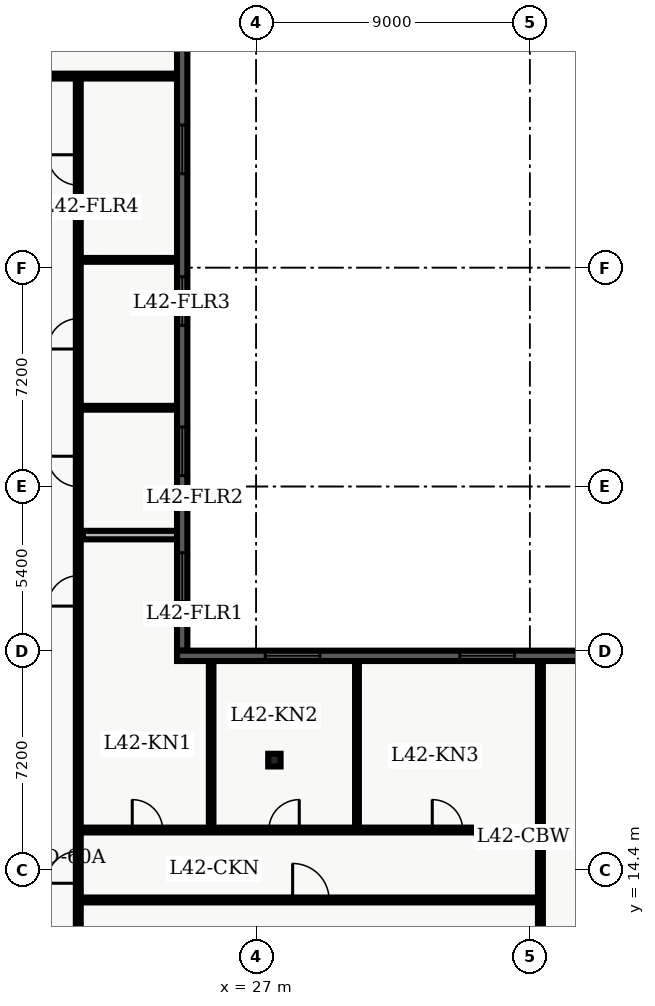
"""IFC4 building model, lengths in metres.
Left out: names, types, materials, properties, quantities, classifications, styles, units other than length and angle.
Written with IfcOpenShell. Run it as: python <this file> out.ifc"""

import sys

from ifc_helpers import new_model, entity, si_unit, converted_unit, direction, frame, origin_with_axes, origin_2d_with_axis, place, context, subcontext, project, spatial, polyline, rectangle, i_section, outline, extrude, element, fill, save


model = new_model("IFC4")
c1 = context("Model", 3, precision=1e-05, world=origin_with_axes(), true_north=direction((0.0, 1.0)))
c2 = subcontext(c1, "Body", "Model", "MODEL_VIEW")
j1 = project(units=[si_unit("LENGTHUNIT", "METRE"), converted_unit("PLANEANGLEUNIT", "DEGREE", entity("IfcPlaneAngleMeasure", 0.017), si_unit("PLANEANGLEUNIT", "RADIAN"), dimensions=[0, 0, 0, 0, 0, 0, 0])], contexts=[c1])
p1 = place(None, origin_with_axes())
s1 = spatial("IfcSite", under=j1, at=p1, CompositionType="ELEMENT")
p2 = place(p1, origin_with_axes())
s2 = spatial("IfcBuilding", under=s1, at=p2, CompositionType="ELEMENT")
p3 = place(p2, frame((0.0, 0.0, 171.9), z_axis=(0.0, 0.0, 1.0), x_axis=(1.0, 0.0, 0.0)))
s3 = spatial("IfcBuildingStorey", under=s2, at=p3, CompositionType="ELEMENT", Elevation=171.9)
p4 = place(p3, frame((27.6, 18.0, 0.0), z_axis=(0.0, 0.0, 1.0), x_axis=(1.0, 0.0, 0.0)))
e1 = element("IfcColumn", 1, at=p4, inside=s3, PredefinedType="COLUMN", context=c2, shape_type="SweptSolid", body=[
    extrude(i_section(OverallWidth=0.406, OverallDepth=0.416, WebThickness=0.03, FlangeThickness=0.048, FilletRadius=0.022, at=origin_2d_with_axis()), origin_with_axes(), (0.0, 0.0, 1.0), 3.9),
])
p5 = place(p3, frame((2.6, 40.5, 0.0), z_axis=(0.0, 0.0, 1.0), x_axis=(1.0, 0.0, 0.0)))
e2 = element("IfcWall", 2, at=p5, inside=s3, PredefinedType="PARTITIONING", context=c2, shape_type="SweptSolid", body=[
    extrude(outline(polyline([(0.0, -0.08), (21.803, -0.08), (21.803, 0.08), (0.0, 0.08), (0.0, -0.08)])), origin_with_axes(), (0.0, 0.0, 1.0), 2.7),
])
p6 = place(p5, frame((3.13, 0.0, 0.0), z_axis=(0.0, 0.0, 1.0), x_axis=(1.0, 0.0, 0.0)))
e3 = element("IfcOpeningElement", 3, at=p6, cuts=e2, PredefinedType="OPENING", context=c2, shape_type="SweptSolid", body=[
    extrude(rectangle(XDim=1.0, YDim=0.18, at=origin_2d_with_axis()), origin_with_axes(), (0.0, 0.0, 1.0), 2.15),
])
p7 = place(p5, frame((8.277, 0.0, 0.0), z_axis=(0.0, 0.0, 1.0), x_axis=(1.0, 0.0, 0.0)))
e4 = element("IfcOpeningElement", 4, at=p7, cuts=e2, PredefinedType="OPENING", context=c2, shape_type="SweptSolid", body=[
    extrude(rectangle(XDim=1.2, YDim=0.18, at=origin_2d_with_axis()), origin_with_axes(), (0.0, 0.0, 1.0), 2.2),
])
p8 = place(p5, frame((15.553, 0.0, 0.0), z_axis=(0.0, 0.0, 1.0), x_axis=(1.0, 0.0, 0.0)))
e5 = element("IfcOpeningElement", 5, at=p8, cuts=e2, PredefinedType="OPENING", context=c2, shape_type="SweptSolid", body=[
    extrude(rectangle(XDim=1.0, YDim=0.18, at=origin_2d_with_axis()), origin_with_axes(), (0.0, 0.0, 1.0), 2.15),
])
p9 = place(p3, frame((21.15, 7.8, 0.0), z_axis=(0.0, 0.0, 1.0), x_axis=(0.0, 1.0, 0.0)))
e6 = element("IfcWall", 6, at=p9, inside=s3, PredefinedType="PARTITIONING", context=c2, shape_type="SweptSolid", body=[
    extrude(outline(polyline([(0.0, -0.08), (32.7, -0.08), (32.7, 0.08), (0.0, 0.08), (0.0, -0.08)])), origin_with_axes(), (0.0, 0.0, 1.0), 2.7),
])
p10 = place(p9, frame((15.766, 0.0, 0.0), z_axis=(0.0, 0.0, 1.0), x_axis=(1.0, 0.0, 0.0)))
e7 = element("IfcOpeningElement", 7, at=p10, cuts=e6, PredefinedType="OPENING", context=c2, shape_type="SweptSolid", body=[
    extrude(rectangle(XDim=1.0, YDim=0.18, at=origin_2d_with_axis()), origin_with_axes(), (0.0, 0.0, 1.0), 2.15),
])
p11 = place(p9, frame((19.696, 0.0, 0.0), z_axis=(0.0, 0.0, 1.0), x_axis=(1.0, 0.0, 0.0)))
e8 = element("IfcOpeningElement", 8, at=p11, cuts=e6, PredefinedType="OPENING", context=c2, shape_type="SweptSolid", body=[
    extrude(rectangle(XDim=1.0, YDim=0.18, at=origin_2d_with_axis()), origin_with_axes(), (0.0, 0.0, 1.0), 2.15),
])
p12 = place(p9, frame((24.223, 0.0, 0.0), z_axis=(0.0, 0.0, 1.0), x_axis=(1.0, 0.0, 0.0)))
e9 = element("IfcOpeningElement", 9, at=p12, cuts=e6, PredefinedType="OPENING", context=c2, shape_type="SweptSolid", body=[
    extrude(rectangle(XDim=1.0, YDim=0.18, at=origin_2d_with_axis()), origin_with_axes(), (0.0, 0.0, 1.0), 2.15),
])
p13 = place(p9, frame((29.613, 0.0, 0.0), z_axis=(0.0, 0.0, 1.0), x_axis=(1.0, 0.0, 0.0)))
e10 = element("IfcOpeningElement", 10, at=p13, cuts=e6, PredefinedType="OPENING", context=c2, shape_type="SweptSolid", body=[
    extrude(rectangle(XDim=1.0, YDim=0.18, at=origin_2d_with_axis()), origin_with_axes(), (0.0, 0.0, 1.0), 2.15),
])
p14 = place(p9, frame((6.675, 0.0, 0.0), z_axis=(0.0, 0.0, 1.0), x_axis=(1.0, 0.0, 0.0)))
e11 = element("IfcOpeningElement", 11, at=p14, cuts=e6, PredefinedType="OPENING", context=c2, shape_type="SweptSolid", body=[
    extrude(rectangle(XDim=1.05, YDim=0.18, at=origin_2d_with_axis()), origin_with_axes(), (0.0, 0.0, 1.0), 2.15),
])
p15 = place(p3, frame((21.3, 25.402, 0.0), z_axis=(0.0, 0.0, 1.0), x_axis=(1.0, 0.0, 0.0)))
e12 = element("IfcWall", 12, at=p15, inside=s3, PredefinedType="PARTITIONING", context=c2, shape_type="SweptSolid", body=[
    extrude(outline(polyline([(0.0, -0.14), (3.103, -0.14), (3.103, 0.14), (0.0, 0.14), (0.0, -0.14)])), origin_with_axes(), (0.0, 0.0, 1.0), 2.7),
])
for number, where, z_axis, x_axis in (
    (13, (21.3, 29.59, 0.0), (0.0, 0.0, 1.0), (1.0, 0.0, 0.0)),
    (14, (21.3, 34.455, 0.0), (0.0, 0.0, 1.0), (1.0, 0.0, 0.0)),
):
    element("IfcWall", number, at=place(p3, frame(where, z_axis=z_axis, x_axis=x_axis)), inside=s3, PredefinedType="PARTITIONING", context=c2, shape_type="SweptSolid", body=[
        extrude(outline(polyline([(0.0, -0.062), (3.103, -0.062), (3.103, 0.062), (0.0, 0.062), (0.0, -0.062)])), origin_with_axes(), (0.0, 0.0, 1.0), 2.7),
    ])
p16 = place(p3, frame((21.15, 13.4, 0.0), z_axis=(0.0, 0.0, 1.0), x_axis=(1.0, 0.0, 0.0)))
e15 = element("IfcWall", 15, at=p16, inside=s3, PredefinedType="PARTITIONING", context=c2, shape_type="SweptSolid", body=[
    extrude(outline(polyline([(0.0, -0.08), (15.2, -0.08), (15.2, 0.08), (0.0, 0.08), (0.0, -0.08)])), origin_with_axes(), (0.0, 0.0, 1.0), 2.7),
])
p17 = place(p16, frame((7.65, 0.0, 0.0), z_axis=(0.0, 0.0, 1.0), x_axis=(1.0, 0.0, 0.0)))
e16 = element("IfcOpeningElement", 16, at=p17, cuts=e15, PredefinedType="OPENING", context=c2, shape_type="SweptSolid", body=[
    extrude(rectangle(XDim=1.2, YDim=0.18, at=origin_2d_with_axis()), origin_with_axes(), (0.0, 0.0, 1.0), 2.2),
])
p18 = place(p3, frame((21.15, 15.7, 0.0), z_axis=(0.0, 0.0, 1.0), x_axis=(1.0, 0.0, 0.0)))
e17 = element("IfcWall", 17, at=p18, inside=s3, PredefinedType="PARTITIONING", context=c2, shape_type="SweptSolid", body=[
    extrude(outline(polyline([(0.0, -0.08), (15.2, -0.08), (15.2, 0.08), (0.0, 0.08), (0.0, -0.08)])), origin_with_axes(), (0.0, 0.0, 1.0), 2.7),
])
p19 = place(p18, frame((2.275, 0.0, 0.0), z_axis=(0.0, 0.0, 1.0), x_axis=(1.0, 0.0, 0.0)))
e18 = element("IfcOpeningElement", 18, at=p19, cuts=e17, PredefinedType="OPENING", context=c2, shape_type="SweptSolid", body=[
    extrude(rectangle(XDim=1.0, YDim=0.18, at=origin_2d_with_axis()), origin_with_axes(), (0.0, 0.0, 1.0), 2.15),
])
p20 = place(p18, frame((6.768, 0.0, 0.0), z_axis=(0.0, 0.0, 1.0), x_axis=(1.0, 0.0, 0.0)))
e19 = element("IfcOpeningElement", 19, at=p20, cuts=e17, PredefinedType="OPENING", context=c2, shape_type="SweptSolid", body=[
    extrude(rectangle(XDim=1.0, YDim=0.18, at=origin_2d_with_axis()), origin_with_axes(), (0.0, 0.0, 1.0), 2.15),
])
p21 = place(p18, frame((12.143, 0.0, 0.0), z_axis=(0.0, 0.0, 1.0), x_axis=(1.0, 0.0, 0.0)))
e20 = element("IfcOpeningElement", 20, at=p21, cuts=e17, PredefinedType="OPENING", context=c2, shape_type="SweptSolid", body=[
    extrude(rectangle(XDim=1.0, YDim=0.18, at=origin_2d_with_axis()), origin_with_axes(), (0.0, 0.0, 1.0), 2.15),
])
p22 = place(p3, frame((36.35, 4.35, 0.0), z_axis=(0.0, 0.0, 1.0), x_axis=(0.0, 1.0, 0.0)))
e21 = element("IfcWall", 21, at=p22, inside=s3, PredefinedType="PARTITIONING", context=c2, shape_type="SweptSolid", body=[
    extrude(outline(polyline([(0.0, -0.08), (16.95, -0.08), (16.95, 0.08), (0.0, 0.08), (0.0, -0.08)])), origin_with_axes(), (0.0, 0.0, 1.0), 2.7),
])
p23 = place(p3, frame((25.52, 15.82, 0.0), z_axis=(0.0, 0.0, 1.0), x_axis=(0.0, 1.0, 0.0)))
e22 = element("IfcWall", 22, at=p23, inside=s3, PredefinedType="PARTITIONING", context=c2, shape_type="SweptSolid", body=[
    extrude(outline(polyline([(0.0, -0.075), (5.445, -0.075), (5.445, 0.075), (0.0, 0.075), (0.0, -0.075)])), origin_with_axes(), (0.0, 0.0, 1.0), 2.7),
])
p24 = place(p3, frame((30.316, 15.82, 0.0), z_axis=(0.0, 0.0, 1.0), x_axis=(0.0, 1.0, 0.0)))
e23 = element("IfcWall", 23, at=p24, inside=s3, PredefinedType="PARTITIONING", context=c2, shape_type="SweptSolid", body=[
    extrude(outline(polyline([(0.0, -0.062), (5.445, -0.062), (5.445, 0.062), (0.0, 0.062), (0.0, -0.062)])), origin_with_axes(), (0.0, 0.0, 1.0), 2.7),
])
p25 = place(p3, frame((24.568, 45.5, 0.0), z_axis=(0.0, 0.0, 1.0), x_axis=(0.0, -1.0, 0.0)))
e24 = element("IfcWall", 24, at=p25, inside=s3, PredefinedType="SOLIDWALL", context=c2, shape_type="SweptSolid", body=[
    extrude(outline(polyline([(0.0, -0.17), (23.9, -0.17), (23.9, 0.17), (0.0, 0.17), (0.0, -0.17)])), origin_with_axes(), (0.0, 0.0, 1.0), 3.66),
])
p26 = place(p25, frame((2.87, 0.0, 0.45), z_axis=(0.0, 0.0, 1.0), x_axis=(1.0, 0.0, 0.0)))
e25 = element("IfcOpeningElement", 25, at=p26, cuts=e24, PredefinedType="OPENING", context=c2, shape_type="SweptSolid", body=[
    extrude(rectangle(XDim=1.6, YDim=0.36, at=origin_2d_with_axis()), origin_with_axes(), (0.0, 0.0, 1.0), 2.2),
])
p27 = place(p25, frame((7.41, 0.0, 0.45), z_axis=(0.0, 0.0, 1.0), x_axis=(1.0, 0.0, 0.0)))
e26 = element("IfcOpeningElement", 26, at=p27, cuts=e24, PredefinedType="OPENING", context=c2, shape_type="SweptSolid", body=[
    extrude(rectangle(XDim=1.6, YDim=0.36, at=origin_2d_with_axis()), origin_with_axes(), (0.0, 0.0, 1.0), 2.2),
])
p28 = place(p25, frame((12.4, 0.0, 0.45), z_axis=(0.0, 0.0, 1.0), x_axis=(1.0, 0.0, 0.0)))
e27 = element("IfcOpeningElement", 27, at=p28, cuts=e24, PredefinedType="OPENING", context=c2, shape_type="SweptSolid", body=[
    extrude(rectangle(XDim=1.6, YDim=0.36, at=origin_2d_with_axis()), origin_with_axes(), (0.0, 0.0, 1.0), 2.2),
])
p29 = place(p25, frame((17.34, 0.0, 0.45), z_axis=(0.0, 0.0, 1.0), x_axis=(1.0, 0.0, 0.0)))
e28 = element("IfcOpeningElement", 28, at=p29, cuts=e24, PredefinedType="OPENING", context=c2, shape_type="SweptSolid", body=[
    extrude(rectangle(XDim=1.6, YDim=0.36, at=origin_2d_with_axis()), origin_with_axes(), (0.0, 0.0, 1.0), 2.2),
])
p30 = place(p25, frame((21.48, 0.0, 0.45), z_axis=(0.0, 0.0, 1.0), x_axis=(1.0, 0.0, 0.0)))
e29 = element("IfcOpeningElement", 29, at=p30, cuts=e24, PredefinedType="OPENING", context=c2, shape_type="SweptSolid", body=[
    extrude(rectangle(XDim=1.6, YDim=0.36, at=origin_2d_with_axis()), origin_with_axes(), (0.0, 0.0, 1.0), 2.2),
])
p31 = place(p3, frame((24.398, 21.43, 0.0), z_axis=(0.0, 0.0, 1.0), x_axis=(1.0, 0.0, 0.0)))
e30 = element("IfcWall", 30, at=p31, inside=s3, PredefinedType="SOLIDWALL", context=c2, shape_type="SweptSolid", body=[
    extrude(outline(polyline([(0.0, -0.17), (14.002, -0.17), (14.002, 0.17), (0.0, 0.17), (0.0, -0.17)])), origin_with_axes(), (0.0, 0.0, 1.0), 3.66),
])
p32 = place(p31, frame((3.801, 0.0, 0.45), z_axis=(0.0, 0.0, 1.0), x_axis=(1.0, 0.0, 0.0)))
e31 = element("IfcOpeningElement", 31, at=p32, cuts=e30, PredefinedType="OPENING", context=c2, shape_type="SweptSolid", body=[
    extrude(rectangle(XDim=1.8, YDim=0.36, at=origin_2d_with_axis()), origin_with_axes(), (0.0, 0.0, 1.0), 2.1),
])
p33 = place(p31, frame((10.201, 0.0, 0.45), z_axis=(0.0, 0.0, 1.0), x_axis=(1.0, 0.0, 0.0)))
e32 = element("IfcOpeningElement", 32, at=p33, cuts=e30, PredefinedType="OPENING", context=c2, shape_type="SweptSolid", body=[
    extrude(rectangle(XDim=1.8, YDim=0.36, at=origin_2d_with_axis()), origin_with_axes(), (0.0, 0.0, 1.0), 2.1),
])
p34 = place(p9, frame((15.766, 0.0, 0.0), z_axis=(0.0, 0.0, 1.0), x_axis=(1.0, 0.0, 0.0)))
e33 = element("IfcDoor", 33, at=p34, inside=s3, OperationType="SINGLE_SWING_LEFT", PredefinedType="DOOR", context=c2, shape_type="SweptSolid", body=[
    extrude(rectangle(XDim=1.0, YDim=0.09, at=origin_2d_with_axis()), origin_with_axes(), (0.0, 0.0, 1.0), 2.15),
])
fill(e7, e33)
p35 = place(p9, frame((19.696, 0.0, 0.0), z_axis=(0.0, 0.0, 1.0), x_axis=(1.0, 0.0, 0.0)))
e34 = element("IfcDoor", 34, at=p35, inside=s3, OperationType="SINGLE_SWING_RIGHT", PredefinedType="DOOR", context=c2, shape_type="SweptSolid", body=[
    extrude(rectangle(XDim=1.0, YDim=0.09, at=origin_2d_with_axis()), origin_with_axes(), (0.0, 0.0, 1.0), 2.15),
])
fill(e8, e34)
p36 = place(p9, frame((24.223, 0.0, 0.0), z_axis=(0.0, 0.0, 1.0), x_axis=(1.0, 0.0, 0.0)))
e35 = element("IfcDoor", 35, at=p36, inside=s3, OperationType="SINGLE_SWING_LEFT", PredefinedType="DOOR", context=c2, shape_type="SweptSolid", body=[
    extrude(rectangle(XDim=1.0, YDim=0.09, at=origin_2d_with_axis()), origin_with_axes(), (0.0, 0.0, 1.0), 2.15),
])
fill(e9, e35)
p37 = place(p9, frame((29.613, 0.0, 0.0), z_axis=(0.0, 0.0, 1.0), x_axis=(1.0, 0.0, 0.0)))
e36 = element("IfcDoor", 36, at=p37, inside=s3, OperationType="SINGLE_SWING_RIGHT", PredefinedType="DOOR", context=c2, shape_type="SweptSolid", body=[
    extrude(rectangle(XDim=1.0, YDim=0.09, at=origin_2d_with_axis()), origin_with_axes(), (0.0, 0.0, 1.0), 2.15),
])
fill(e10, e36)
p38 = place(p9, frame((6.675, 0.0, 0.0), z_axis=(0.0, 0.0, 1.0), x_axis=(1.0, 0.0, 0.0)))
e37 = element("IfcDoor", 37, at=p38, inside=s3, OperationType="SINGLE_SWING_LEFT", PredefinedType="DOOR", context=c2, shape_type="SweptSolid", body=[
    extrude(rectangle(XDim=1.05, YDim=0.09, at=origin_2d_with_axis()), origin_with_axes(), (0.0, 0.0, 1.0), 2.15),
])
fill(e11, e37)
p39 = place(p16, frame((7.65, 0.0, 0.0), z_axis=(0.0, 0.0, 1.0), x_axis=(1.0, 0.0, 0.0)))
e38 = element("IfcDoor", 38, at=p39, inside=s3, OperationType="SINGLE_SWING_LEFT", PredefinedType="DOOR", context=c2, shape_type="SweptSolid", body=[
    extrude(rectangle(XDim=1.2, YDim=0.09, at=origin_2d_with_axis()), origin_with_axes(), (0.0, 0.0, 1.0), 2.2),
])
fill(e16, e38)
p40 = place(p18, frame((2.275, 0.0, 0.0), z_axis=(0.0, 0.0, 1.0), x_axis=(1.0, 0.0, 0.0)))
e39 = element("IfcDoor", 39, at=p40, inside=s3, OperationType="SINGLE_SWING_LEFT", PredefinedType="DOOR", context=c2, shape_type="SweptSolid", body=[
    extrude(rectangle(XDim=1.0, YDim=0.09, at=origin_2d_with_axis()), origin_with_axes(), (0.0, 0.0, 1.0), 2.15),
])
fill(e18, e39)
p41 = place(p18, frame((6.768, 0.0, 0.0), z_axis=(0.0, 0.0, 1.0), x_axis=(1.0, 0.0, 0.0)))
e40 = element("IfcDoor", 40, at=p41, inside=s3, OperationType="SINGLE_SWING_RIGHT", PredefinedType="DOOR", context=c2, shape_type="SweptSolid", body=[
    extrude(rectangle(XDim=1.0, YDim=0.09, at=origin_2d_with_axis()), origin_with_axes(), (0.0, 0.0, 1.0), 2.15),
])
fill(e19, e40)
p42 = place(p18, frame((12.143, 0.0, 0.0), z_axis=(0.0, 0.0, 1.0), x_axis=(1.0, 0.0, 0.0)))
e41 = element("IfcDoor", 41, at=p42, inside=s3, OperationType="SINGLE_SWING_LEFT", PredefinedType="DOOR", context=c2, shape_type="SweptSolid", body=[
    extrude(rectangle(XDim=1.0, YDim=0.09, at=origin_2d_with_axis()), origin_with_axes(), (0.0, 0.0, 1.0), 2.15),
])
fill(e20, e41)
p43 = place(p25, frame((7.41, 0.0, 0.45), z_axis=(0.0, 0.0, 1.0), x_axis=(1.0, 0.0, 0.0)))
e42 = element("IfcWindow", 42, at=p43, inside=s3, PredefinedType="WINDOW", context=c2, shape_type="SweptSolid", body=[
    extrude(rectangle(XDim=1.6, YDim=0.09, at=origin_2d_with_axis()), origin_with_axes(), (0.0, 0.0, 1.0), 2.2),
])
fill(e26, e42)
p44 = place(p25, frame((12.4, 0.0, 0.45), z_axis=(0.0, 0.0, 1.0), x_axis=(1.0, 0.0, 0.0)))
e43 = element("IfcWindow", 43, at=p44, inside=s3, PredefinedType="WINDOW", context=c2, shape_type="SweptSolid", body=[
    extrude(rectangle(XDim=1.6, YDim=0.09, at=origin_2d_with_axis()), origin_with_axes(), (0.0, 0.0, 1.0), 2.2),
])
fill(e27, e43)
p45 = place(p25, frame((17.34, 0.0, 0.45), z_axis=(0.0, 0.0, 1.0), x_axis=(1.0, 0.0, 0.0)))
e44 = element("IfcWindow", 44, at=p45, inside=s3, PredefinedType="WINDOW", context=c2, shape_type="SweptSolid", body=[
    extrude(rectangle(XDim=1.6, YDim=0.09, at=origin_2d_with_axis()), origin_with_axes(), (0.0, 0.0, 1.0), 2.2),
])
fill(e28, e44)
p46 = place(p25, frame((21.48, 0.0, 0.45), z_axis=(0.0, 0.0, 1.0), x_axis=(1.0, 0.0, 0.0)))
e45 = element("IfcWindow", 45, at=p46, inside=s3, PredefinedType="WINDOW", context=c2, shape_type="SweptSolid", body=[
    extrude(rectangle(XDim=1.6, YDim=0.09, at=origin_2d_with_axis()), origin_with_axes(), (0.0, 0.0, 1.0), 2.2),
])
fill(e29, e45)
p47 = place(p31, frame((3.801, 0.0, 0.45), z_axis=(0.0, 0.0, 1.0), x_axis=(1.0, 0.0, 0.0)))
e46 = element("IfcWindow", 46, at=p47, inside=s3, PredefinedType="WINDOW", context=c2, shape_type="SweptSolid", body=[
    extrude(rectangle(XDim=1.8, YDim=0.09, at=origin_2d_with_axis()), origin_with_axes(), (0.0, 0.0, 1.0), 2.1),
])
fill(e31, e46)
p48 = place(p31, frame((10.201, 0.0, 0.45), z_axis=(0.0, 0.0, 1.0), x_axis=(1.0, 0.0, 0.0)))
e47 = element("IfcWindow", 47, at=p48, inside=s3, PredefinedType="WINDOW", context=c2, shape_type="SweptSolid", body=[
    extrude(rectangle(XDim=1.8, YDim=0.09, at=origin_2d_with_axis()), origin_with_axes(), (0.0, 0.0, 1.0), 2.1),
])
fill(e32, e47)
save(model, sys.argv[1])
